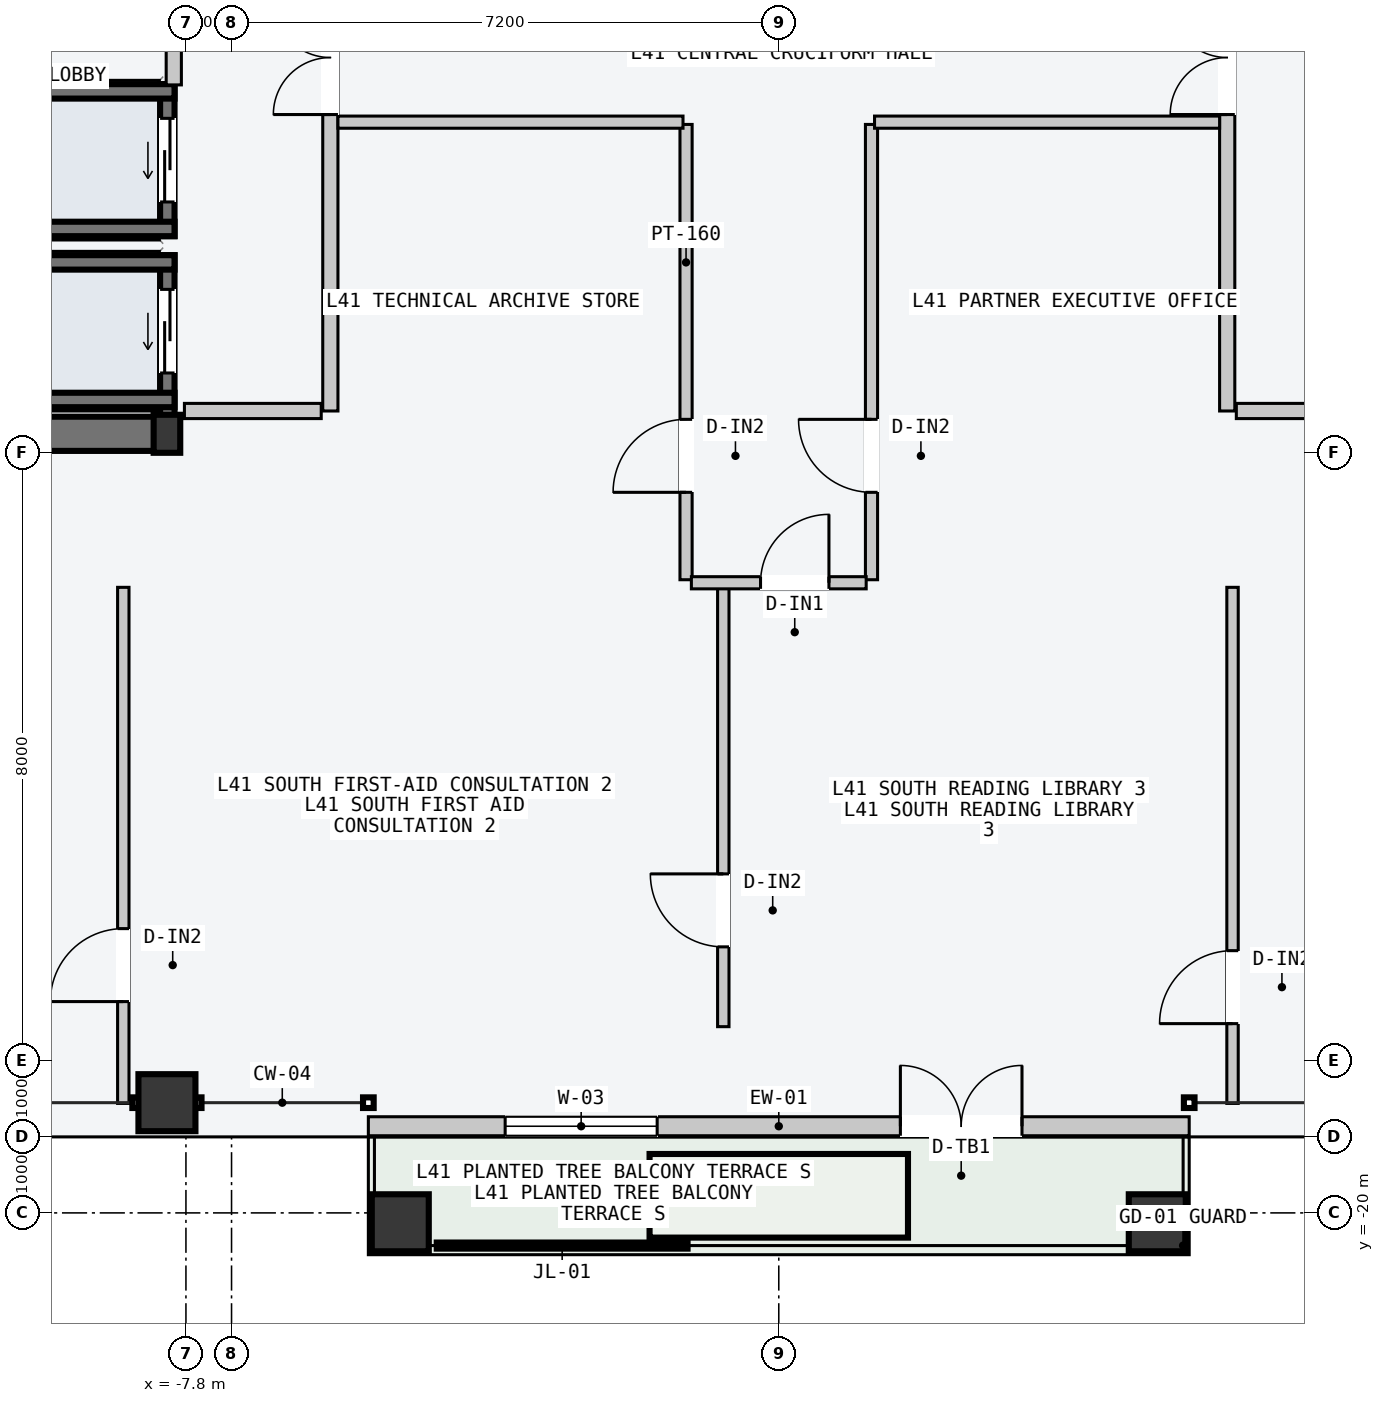
"""IFC4 building model, lengths in metres.
Left out: names, types, materials, properties, quantities, classifications, styles, units other than length and angle.
Written with IfcOpenShell. Run it as: python <this file> out.ifc"""

import sys

from ifc_helpers import new_model, si_unit, direction, frame, frame_2d, origin, origin_2d, place, context, subcontext, project, spatial, rectangle, hollow_rectangle, i_section, extrude, element, fill, save


model = new_model("IFC4")
c1 = context("Model", 3, precision=1e-05, world=origin(), true_north=direction((0.0, 1.0)))
c2 = subcontext(c1, "Body", "Model", "MODEL_VIEW")
j1 = project(units=[si_unit("LENGTHUNIT", "METRE"), si_unit("PLANEANGLEUNIT", "RADIAN")], contexts=[c1])
p1 = place(None, origin())
s1 = spatial("IfcSite", under=j1, at=p1, CompositionType="ELEMENT")
p2 = place(p1, origin())
s2 = spatial("IfcBuilding", under=s1, at=p2, CompositionType="ELEMENT")
p3 = place(p2, frame((0.0, 0.0, 158.7)))
s3 = spatial("IfcBuildingStorey", under=s2, at=p3, CompositionType="ELEMENT", Elevation=158.7)
p4 = place(p3, frame((-14.53, -9.75, -0.2), z_axis=(0.0, 0.0, 1.0), x_axis=(1.0, 0.0, 0.0)))
e1 = element("IfcWall", 1, at=p4, inside=s3, PredefinedType="SHEAR", context=c2, shape_type="SweptSolid", body=[
    extrude(rectangle(XDim=6.46, YDim=0.45, at=frame_2d((3.23, 0.0))), origin(), (0.0, 0.0, 1.0), 3.6),
])
p5 = place(p3, frame((-8.05, -9.75, 0.0), z_axis=(0.0, 0.0, 1.0), x_axis=(1.0, 0.0, 0.0)))
e2 = element("IfcColumn", 2, at=p5, inside=s3, PredefinedType="COLUMN", context=c2, shape_type="SweptSolid", body=[
    extrude(i_section(OverallWidth=0.35, OverallDepth=0.5, WebThickness=0.02, FlangeThickness=0.032, at=origin_2d()), origin(), (0.0, 0.0, 1.0), 3.6),
])
p6 = place(p3, frame((-8.05, -18.55, 0.0), z_axis=(0.0, 0.0, 1.0), x_axis=(1.0, 0.0, 0.0)))
e3 = element("IfcColumn", 3, at=p6, inside=s3, PredefinedType="COLUMN", context=c2, shape_type="SweptSolid", body=[
    extrude(hollow_rectangle(XDim=0.75, YDim=0.75, WallThickness=0.032, at=origin_2d()), origin(), (0.0, 0.0, 1.0), 3.6),
])
for number, where, z_axis, x_axis in (
    (4, (-4.98, -20.13, -0.2), (0.0, 0.0, 1.0), (1.0, 0.0, 0.0)),
    (5, (4.98, -20.13, -0.2), (0.0, 0.0, 1.0), (1.0, 0.0, 0.0)),
):
    element("IfcColumn", number, at=place(p3, frame(where, z_axis=z_axis, x_axis=x_axis)), inside=s3, PredefinedType="COLUMN", context=c2, shape_type="SweptSolid", body=[
        extrude(hollow_rectangle(XDim=0.75, YDim=0.75, WallThickness=0.032, at=origin_2d()), origin(), (0.0, 0.0, 1.0), 3.8),
    ])
p7 = place(p3, frame((-5.4, -18.86, 0.0), z_axis=(0.0, 0.0, 1.0), x_axis=(1.0, 0.0, 0.0)))
e6 = element("IfcWall", 6, at=p7, inside=s3, PredefinedType="STANDARD", context=c2, shape_type="SweptSolid", body=[
    extrude(rectangle(XDim=10.8, YDim=0.25, at=frame_2d((5.4, 0.0))), origin(), (0.0, 0.0, 1.0), 3.4),
])
p8 = place(p7, frame((7.0, 0.0, 0.0)))
e7 = element("IfcOpeningElement", 7, at=p8, cuts=e6, PredefinedType="OPENING", context=c2, shape_type="SweptSolid", body=[
    extrude(rectangle(XDim=1.6, YDim=2.2, at=frame_2d((0.8, 1.1))), frame((0.0, 0.135, 0.0), z_axis=(0.0, -1.0, 0.0), x_axis=(1.0, 0.0, 0.0)), (0.0, 0.0, 1.0), 0.27),
])
p9 = place(p7, frame((1.8, 0.0, 0.85)))
e8 = element("IfcOpeningElement", 8, at=p9, cuts=e6, PredefinedType="OPENING", context=c2, shape_type="SweptSolid", body=[
    extrude(rectangle(XDim=2.0, YDim=2.1, at=frame_2d((1.0, 1.05))), frame((0.0, 0.135, 0.0), z_axis=(0.0, -1.0, 0.0), x_axis=(1.0, 0.0, 0.0)), (0.0, 0.0, 1.0), 0.27),
])
p10 = place(p3, frame((-8.045, -9.52, -0.2), z_axis=(0.0, 0.0, 1.0), x_axis=(0.0, 1.0, 0.0)))
e9 = element("IfcWall", 9, at=p10, inside=s3, PredefinedType="SOLIDWALL", context=c2, shape_type="SweptSolid", body=[
    extrude(rectangle(XDim=2.12, YDim=0.19, at=frame_2d((1.06, 0.0))), origin(), (0.0, 0.0, 1.0), 3.6),
])
p11 = place(p10, frame((0.57, 0.0, 0.2)))
e10 = element("IfcOpeningElement", 10, at=p11, cuts=e9, PredefinedType="OPENING", context=c2, shape_type="SweptSolid", body=[
    extrude(rectangle(XDim=1.1, YDim=2.2, at=frame_2d((0.55, 1.1))), frame((0.0, 0.105, 0.0), z_axis=(0.0, -1.0, 0.0), x_axis=(1.0, 0.0, 0.0)), (0.0, 0.0, 1.0), 0.21),
])
for number, where, z_axis, x_axis in (
    (11, (-10.15, -7.495, -0.2), (0.0, 0.0, 1.0), (1.0, 0.0, 0.0)),
    (12, (-10.15, -9.305, -0.2), (0.0, 0.0, 1.0), (1.0, 0.0, 0.0)),
):
    element("IfcWall", number, at=place(p3, frame(where, z_axis=z_axis, x_axis=x_axis)), inside=s3, PredefinedType="SOLIDWALL", context=c2, shape_type="SweptSolid", body=[
        extrude(rectangle(XDim=2.2, YDim=0.19, at=frame_2d((1.1, 0.0))), origin(), (0.0, 0.0, 1.0), 3.6),
    ])
p12 = place(p3, frame((-8.045, -7.15, -0.2), z_axis=(0.0, 0.0, 1.0), x_axis=(0.0, 1.0, 0.0)))
e13 = element("IfcWall", 13, at=p12, inside=s3, PredefinedType="SOLIDWALL", context=c2, shape_type="SweptSolid", body=[
    extrude(rectangle(XDim=2.0, YDim=0.19, at=frame_2d((1.0, 0.0))), origin(), (0.0, 0.0, 1.0), 3.6),
])
p13 = place(p12, frame((0.45, 0.0, 0.2)))
e14 = element("IfcOpeningElement", 14, at=p13, cuts=e13, PredefinedType="OPENING", context=c2, shape_type="SweptSolid", body=[
    extrude(rectangle(XDim=1.1, YDim=2.2, at=frame_2d((0.55, 1.1))), frame((0.0, 0.105, 0.0), z_axis=(0.0, -1.0, 0.0), x_axis=(1.0, 0.0, 0.0)), (0.0, 0.0, 1.0), 0.21),
])
for number, where, z_axis, x_axis in (
    (15, (-10.15, -5.245, -0.2), (0.0, 0.0, 1.0), (1.0, 0.0, 0.0)),
    (16, (-10.15, -7.055, -0.2), (0.0, 0.0, 1.0), (1.0, 0.0, 0.0)),
):
    element("IfcWall", number, at=place(p3, frame(where, z_axis=z_axis, x_axis=x_axis)), inside=s3, PredefinedType="SOLIDWALL", context=c2, shape_type="SweptSolid", body=[
        extrude(rectangle(XDim=2.2, YDim=0.19, at=frame_2d((1.1, 0.0))), origin(), (0.0, 0.0, 1.0), 3.6),
    ])
p14 = place(p3, frame((-5.9, -9.45, 0.0), z_axis=(0.0, 0.0, 1.0), x_axis=(0.0, 1.0, 0.0)))
e17 = element("IfcWall", 17, at=p14, inside=s3, PredefinedType="PARTITIONING", context=c2, shape_type="SweptSolid", body=[
    extrude(rectangle(XDim=10.5, YDim=0.2, at=frame_2d((5.25, 0.0))), origin(), (0.0, 0.0, 1.0), 3.4),
])
p15 = place(p14, frame((3.9, 0.0, 0.0)))
e18 = element("IfcOpeningElement", 18, at=p15, cuts=e17, PredefinedType="OPENING", context=c2, shape_type="SweptSolid", body=[
    extrude(rectangle(XDim=1.5, YDim=2.2, at=frame_2d((0.75, 1.1))), frame((0.0, 0.11, 0.0), z_axis=(0.0, -1.0, 0.0), x_axis=(1.0, 0.0, 0.0)), (0.0, 0.0, 1.0), 0.22),
])
p16 = place(p3, frame((-6.02, -9.45, 0.0), z_axis=(0.0, 0.0, 1.0), x_axis=(-1.0, 0.0, 0.0)))
e19 = element("IfcWall", 19, at=p16, inside=s3, PredefinedType="PARTITIONING", context=c2, shape_type="SweptSolid", body=[
    extrude(rectangle(XDim=1.8, YDim=0.2, at=frame_2d((0.9, 0.0))), origin(), (0.0, 0.0, 1.0), 3.4),
])
p17 = place(p3, frame((-7.96, -5.16, 0.0), z_axis=(0.0, 0.0, 1.0), x_axis=(0.0, 1.0, 0.0)))
e20 = element("IfcWall", 20, at=p17, inside=s3, PredefinedType="PARTITIONING", context=c2, shape_type="SweptSolid", body=[
    extrude(rectangle(XDim=2.44, YDim=0.2, at=frame_2d((1.22, 0.0))), origin(), (0.0, 0.0, 1.0), 3.4),
])
p18 = place(p3, frame((5.9, -9.45, 0.0), z_axis=(0.0, 0.0, 1.0), x_axis=(0.0, 1.0, 0.0)))
e21 = element("IfcWall", 21, at=p18, inside=s3, PredefinedType="PARTITIONING", context=c2, shape_type="SweptSolid", body=[
    extrude(rectangle(XDim=10.5, YDim=0.2, at=frame_2d((5.25, 0.0))), origin(), (0.0, 0.0, 1.0), 3.4),
])
p19 = place(p18, frame((3.9, 0.0, 0.0)))
e22 = element("IfcOpeningElement", 22, at=p19, cuts=e21, PredefinedType="OPENING", context=c2, shape_type="SweptSolid", body=[
    extrude(rectangle(XDim=1.5, YDim=2.2, at=frame_2d((0.75, 1.1))), frame((0.0, 0.11, 0.0), z_axis=(0.0, -1.0, 0.0), x_axis=(1.0, 0.0, 0.0)), (0.0, 0.0, 1.0), 0.22),
])
p20 = place(p3, frame((6.02, -9.45, 0.0), z_axis=(0.0, 0.0, 1.0), x_axis=(1.0, 0.0, 0.0)))
e23 = element("IfcWall", 23, at=p20, inside=s3, PredefinedType="PARTITIONING", context=c2, shape_type="SweptSolid", body=[
    extrude(rectangle(XDim=1.8, YDim=0.2, at=frame_2d((0.9, 0.0))), origin(), (0.0, 0.0, 1.0), 3.4),
])
p21 = place(p3, frame((-1.22, -11.67, 0.0), z_axis=(0.0, 0.0, 1.0), x_axis=(0.0, 1.0, 0.0)))
e24 = element("IfcWall", 24, at=p21, inside=s3, PredefinedType="PARTITIONING", context=c2, shape_type="SweptSolid", body=[
    extrude(rectangle(XDim=5.99, YDim=0.16, at=frame_2d((2.995, 0.0))), origin(), (0.0, 0.0, 1.0), 3.4),
])
p22 = place(p21, frame((1.15, 0.0, 0.0)))
e25 = element("IfcOpeningElement", 25, at=p22, cuts=e24, PredefinedType="OPENING", context=c2, shape_type="SweptSolid", body=[
    extrude(rectangle(XDim=0.96, YDim=2.18, at=frame_2d((0.48, 1.09))), frame((0.0, 0.09, 0.0), z_axis=(0.0, -1.0, 0.0), x_axis=(1.0, 0.0, 0.0)), (0.0, 0.0, 1.0), 0.18),
])
p23 = place(p3, frame((1.22, -11.67, 0.0), z_axis=(0.0, 0.0, 1.0), x_axis=(0.0, 1.0, 0.0)))
e26 = element("IfcWall", 26, at=p23, inside=s3, PredefinedType="PARTITIONING", context=c2, shape_type="SweptSolid", body=[
    extrude(rectangle(XDim=5.99, YDim=0.16, at=frame_2d((2.995, 0.0))), origin(), (0.0, 0.0, 1.0), 3.4),
])
p24 = place(p23, frame((1.15, 0.0, 0.0)))
e27 = element("IfcOpeningElement", 27, at=p24, cuts=e26, PredefinedType="OPENING", context=c2, shape_type="SweptSolid", body=[
    extrude(rectangle(XDim=0.96, YDim=2.18, at=frame_2d((0.48, 1.09))), frame((0.0, 0.09, 0.0), z_axis=(0.0, -1.0, 0.0), x_axis=(1.0, 0.0, 0.0)), (0.0, 0.0, 1.0), 0.18),
])
for number, where, z_axis, x_axis in (
    (28, (-5.8, -5.65, 0.0), (0.0, 0.0, 1.0), (1.0, 0.0, 0.0)),
    (29, (1.26, -5.65, 0.0), (0.0, 0.0, 1.0), (1.0, 0.0, 0.0)),
):
    element("IfcWall", number, at=place(p3, frame(where, z_axis=z_axis, x_axis=x_axis)), inside=s3, PredefinedType="PARTITIONING", context=c2, shape_type="SweptSolid", body=[
        extrude(rectangle(XDim=4.54, YDim=0.16, at=frame_2d((2.27, 0.0))), origin(), (0.0, 0.0, 1.0), 3.4),
    ])
p25 = place(p3, frame((-8.624, -18.56, 0.0), z_axis=(0.0, 0.0, 1.0), x_axis=(0.0, 1.0, 0.0)))
e30 = element("IfcWall", 30, at=p25, inside=s3, PredefinedType="PARTITIONING", context=c2, shape_type="SweptSolid", body=[
    extrude(rectangle(XDim=6.79, YDim=0.15, at=frame_2d((3.395, 0.0))), origin(), (0.0, 0.0, 1.0), 3.4),
])
p26 = place(p25, frame((1.34, 0.0, 0.0)))
e31 = element("IfcOpeningElement", 31, at=p26, cuts=e30, PredefinedType="OPENING", context=c2, shape_type="SweptSolid", body=[
    extrude(rectangle(XDim=0.96, YDim=2.18, at=frame_2d((0.48, 1.09))), frame((0.0, 0.085, 0.0), z_axis=(0.0, -1.0, 0.0), x_axis=(1.0, 0.0, 0.0)), (0.0, 0.0, 1.0), 0.17),
])
p27 = place(p3, frame((-0.73, -17.55, 0.0), z_axis=(0.0, 0.0, 1.0), x_axis=(0.0, 1.0, 0.0)))
e32 = element("IfcWall", 32, at=p27, inside=s3, PredefinedType="PARTITIONING", context=c2, shape_type="SweptSolid", body=[
    extrude(rectangle(XDim=5.78, YDim=0.15, at=frame_2d((2.89, 0.0))), origin(), (0.0, 0.0, 1.0), 3.4),
])
p28 = place(p27, frame((1.05, 0.0, 0.0)))
e33 = element("IfcOpeningElement", 33, at=p28, cuts=e32, PredefinedType="OPENING", context=c2, shape_type="SweptSolid", body=[
    extrude(rectangle(XDim=0.96, YDim=2.18, at=frame_2d((0.48, 1.09))), frame((0.0, 0.085, 0.0), z_axis=(0.0, -1.0, 0.0), x_axis=(1.0, 0.0, 0.0)), (0.0, 0.0, 1.0), 0.17),
])
p29 = place(p3, frame((5.97, -18.56, 0.0), z_axis=(0.0, 0.0, 1.0), x_axis=(0.0, 1.0, 0.0)))
e34 = element("IfcWall", 34, at=p29, inside=s3, PredefinedType="PARTITIONING", context=c2, shape_type="SweptSolid", body=[
    extrude(rectangle(XDim=6.79, YDim=0.15, at=frame_2d((3.395, 0.0))), origin(), (0.0, 0.0, 1.0), 3.4),
])
p30 = place(p29, frame((1.05, 0.0, 0.0)))
e35 = element("IfcOpeningElement", 35, at=p30, cuts=e34, PredefinedType="OPENING", context=c2, shape_type="SweptSolid", body=[
    extrude(rectangle(XDim=0.96, YDim=2.18, at=frame_2d((0.48, 1.09))), frame((0.0, 0.085, 0.0), z_axis=(0.0, -1.0, 0.0), x_axis=(1.0, 0.0, 0.0)), (0.0, 0.0, 1.0), 0.17),
])
p31 = place(p3, frame((-1.15, -11.71, 0.0), z_axis=(0.0, 0.0, 1.0), x_axis=(1.0, 0.0, 0.0)))
e36 = element("IfcWall", 36, at=p31, inside=s3, PredefinedType="PARTITIONING", context=c2, shape_type="SweptSolid", body=[
    extrude(rectangle(XDim=2.3, YDim=0.16, at=frame_2d((1.15, 0.0))), origin(), (0.0, 0.0, 1.0), 3.4),
])
p32 = place(p31, frame((0.91, 0.0, 0.0)))
e37 = element("IfcOpeningElement", 37, at=p32, cuts=e36, PredefinedType="OPENING", context=c2, shape_type="SweptSolid", body=[
    extrude(rectangle(XDim=0.9, YDim=2.15, at=frame_2d((0.45, 1.075))), frame((0.0, 0.09, 0.0), z_axis=(0.0, -1.0, 0.0), x_axis=(1.0, 0.0, 0.0)), (0.0, 0.0, 1.0), 0.18),
])
p33 = place(p8, origin())
e38 = element("IfcDoor", 38, at=p33, inside=s3, OperationType="DOUBLE_DOOR_SINGLE_SWING", PredefinedType="DOOR", context=c2, shape_type="SweptSolid", body=[
    extrude(rectangle(XDim=1.6, YDim=2.2, at=frame_2d((0.8, 1.1))), frame((0.0, 0.025, 0.0), z_axis=(0.0, -1.0, 0.0), x_axis=(1.0, 0.0, 0.0)), (0.0, 0.0, 1.0), 0.05),
])
fill(e7, e38)
p34 = place(p9, origin())
e39 = element("IfcWindow", 39, at=p34, inside=s3, PartitioningType="SINGLE_PANEL", PredefinedType="WINDOW", context=c2, shape_type="SweptSolid", body=[
    extrude(rectangle(XDim=2.0, YDim=2.1, at=frame_2d((1.0, 1.05))), frame((0.0, 0.03, 0.0), z_axis=(0.0, -1.0, 0.0), x_axis=(1.0, 0.0, 0.0)), (0.0, 0.0, 1.0), 0.06),
])
fill(e8, e39)
p35 = place(p11, origin())
e40 = element("IfcDoor", 40, at=p35, inside=s3, OperationType="SLIDING_TO_LEFT", PredefinedType="DOOR", context=c2, shape_type="SweptSolid", body=[
    extrude(rectangle(XDim=1.1, YDim=2.2, at=frame_2d((0.55, 1.1))), frame((0.0, 0.025, 0.0), z_axis=(0.0, -1.0, 0.0), x_axis=(1.0, 0.0, 0.0)), (0.0, 0.0, 1.0), 0.05),
])
fill(e10, e40)
p36 = place(p13, origin())
e41 = element("IfcDoor", 41, at=p36, inside=s3, OperationType="SLIDING_TO_LEFT", PredefinedType="DOOR", context=c2, shape_type="SweptSolid", body=[
    extrude(rectangle(XDim=1.1, YDim=2.2, at=frame_2d((0.55, 1.1))), frame((0.0, 0.025, 0.0), z_axis=(0.0, -1.0, 0.0), x_axis=(1.0, 0.0, 0.0)), (0.0, 0.0, 1.0), 0.05),
])
fill(e14, e41)
p37 = place(p15, origin())
e42 = element("IfcDoor", 42, at=p37, inside=s3, OperationType="DOUBLE_DOOR_SINGLE_SWING", PredefinedType="DOOR", context=c2, shape_type="SweptSolid", body=[
    extrude(rectangle(XDim=1.5, YDim=2.2, at=frame_2d((0.75, 1.1))), frame((0.0, 0.025, 0.0), z_axis=(0.0, -1.0, 0.0), x_axis=(1.0, 0.0, 0.0)), (0.0, 0.0, 1.0), 0.05),
])
fill(e18, e42)
p38 = place(p19, origin())
e43 = element("IfcDoor", 43, at=p38, inside=s3, OperationType="DOUBLE_DOOR_SINGLE_SWING", PredefinedType="DOOR", context=c2, shape_type="SweptSolid", body=[
    extrude(rectangle(XDim=1.5, YDim=2.2, at=frame_2d((0.75, 1.1))), frame((0.0, 0.025, 0.0), z_axis=(0.0, -1.0, 0.0), x_axis=(1.0, 0.0, 0.0)), (0.0, 0.0, 1.0), 0.05),
])
fill(e22, e43)
p39 = place(p22, origin())
e44 = element("IfcDoor", 44, at=p39, inside=s3, OperationType="SINGLE_SWING_LEFT", PredefinedType="DOOR", context=c2, shape_type="SweptSolid", body=[
    extrude(rectangle(XDim=0.96, YDim=2.18, at=frame_2d((0.48, 1.09))), frame((0.0, 0.025, 0.0), z_axis=(0.0, -1.0, 0.0), x_axis=(1.0, 0.0, 0.0)), (0.0, 0.0, 1.0), 0.05),
])
fill(e25, e44)
p40 = place(p24, origin())
e45 = element("IfcDoor", 45, at=p40, inside=s3, OperationType="SINGLE_SWING_RIGHT", PredefinedType="DOOR", context=c2, shape_type="SweptSolid", body=[
    extrude(rectangle(XDim=0.96, YDim=2.18, at=frame_2d((0.48, 1.09))), frame((0.0, 0.025, 0.0), z_axis=(0.0, -1.0, 0.0), x_axis=(1.0, 0.0, 0.0)), (0.0, 0.0, 1.0), 0.05),
])
fill(e27, e45)
p41 = place(p26, origin())
e46 = element("IfcDoor", 46, at=p41, inside=s3, OperationType="SINGLE_SWING_LEFT", PredefinedType="DOOR", context=c2, shape_type="SweptSolid", body=[
    extrude(rectangle(XDim=0.96, YDim=2.18, at=frame_2d((0.48, 1.09))), frame((0.0, 0.025, 0.0), z_axis=(0.0, -1.0, 0.0), x_axis=(1.0, 0.0, 0.0)), (0.0, 0.0, 1.0), 0.05),
])
fill(e31, e46)
p42 = place(p28, origin())
e47 = element("IfcDoor", 47, at=p42, inside=s3, OperationType="SINGLE_SWING_RIGHT", PredefinedType="DOOR", context=c2, shape_type="SweptSolid", body=[
    extrude(rectangle(XDim=0.96, YDim=2.18, at=frame_2d((0.48, 1.09))), frame((0.0, 0.025, 0.0), z_axis=(0.0, -1.0, 0.0), x_axis=(1.0, 0.0, 0.0)), (0.0, 0.0, 1.0), 0.05),
])
fill(e33, e47)
p43 = place(p30, origin())
e48 = element("IfcDoor", 48, at=p43, inside=s3, OperationType="SINGLE_SWING_LEFT", PredefinedType="DOOR", context=c2, shape_type="SweptSolid", body=[
    extrude(rectangle(XDim=0.96, YDim=2.18, at=frame_2d((0.48, 1.09))), frame((0.0, 0.025, 0.0), z_axis=(0.0, -1.0, 0.0), x_axis=(1.0, 0.0, 0.0)), (0.0, 0.0, 1.0), 0.05),
])
fill(e35, e48)
p44 = place(p32, origin())
e49 = element("IfcDoor", 49, at=p44, inside=s3, OperationType="SINGLE_SWING_RIGHT", PredefinedType="DOOR", context=c2, shape_type="SweptSolid", body=[
    extrude(rectangle(XDim=0.9, YDim=2.15, at=frame_2d((0.45, 1.075))), frame((0.0, 0.025, 0.0), z_axis=(0.0, -1.0, 0.0), x_axis=(1.0, 0.0, 0.0)), (0.0, 0.0, 1.0), 0.05),
])
fill(e37, e49)
save(model, sys.argv[1])
